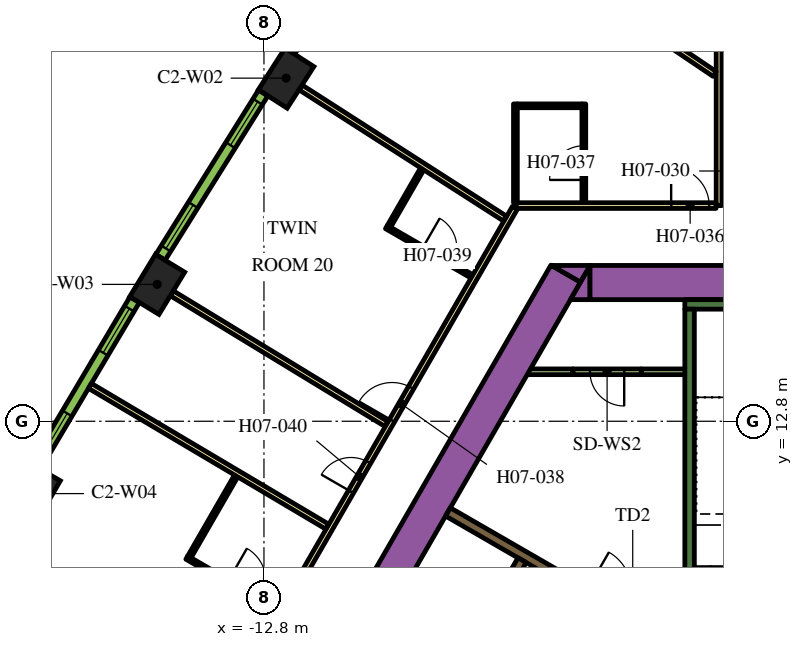
"""IFC4 building model, lengths in metres.
Left out: names, types, materials, properties, quantities, classifications, styles, units other than length and angle.
Written with IfcOpenShell. Run it as: python <this file> out.ifc"""

import sys

from ifc_helpers import new_model, si_unit, direction, frame, frame_2d, origin, origin_2d, place, context, subcontext, project, spatial, polyline, rectangle, outline, extrude, element, fill, save


model = new_model("IFC4")
c1 = context("Model", 3, precision=1e-05, world=origin(), true_north=direction((0.0, 1.0)))
c2 = subcontext(c1, "Body", "Model", "MODEL_VIEW")
j1 = project(units=[si_unit("LENGTHUNIT", "METRE"), si_unit("PLANEANGLEUNIT", "RADIAN")], contexts=[c1])
p1 = place(None, origin())
s1 = spatial("IfcSite", under=j1, at=p1, CompositionType="ELEMENT")
p2 = place(p1, origin())
s2 = spatial("IfcBuilding", under=s1, at=p2, CompositionType="ELEMENT")
p3 = place(p2, frame((0.0, 0.0, 95.4)))
s3 = spatial("IfcBuildingStorey", under=s2, at=p3, CompositionType="ELEMENT", Elevation=95.4)
for number, where, z_axis, x_axis in (
    (1, (-12.217, 21.828, 0.0), (0.0, 0.0, 1.0), (-0.54, -0.842, 0.0)),
    (2, (-15.609, 16.402, 0.0), (0.0, 0.0, 1.0), (-0.52, -0.854, 0.0)),
    (3, (-18.874, 10.897, 0.0), (0.0, 0.0, 1.0), (-0.5, -0.866, 0.0)),
):
    element("IfcColumn", number, at=place(p3, frame(where, z_axis=z_axis, x_axis=x_axis)), inside=s3, PredefinedType="COLUMN", context=c2, shape_type="SweptSolid", body=[
        extrude(rectangle(XDim=1.3, YDim=0.9, at=origin_2d()), origin(), (0.0, 0.0, 1.0), 3.9),
    ])
p4 = place(p3, frame((-15.36, -1.503, 0.0), z_axis=(0.0, 0.0, 1.0), x_axis=(0.50000389221, 0.866023156604, 0.0)))
e4 = element("IfcWall", 4, at=p4, inside=s3, PredefinedType="SOLIDWALL", context=c2, shape_type="SweptSolid", body=[
    extrude(rectangle(XDim=21.0, YDim=0.9, at=frame_2d((10.5, 0.0))), origin(), (0.0, 0.0, 1.0), 3.9),
])
p5 = place(p3, origin())
e5 = element("IfcWall", 5, at=p5, inside=s3, PredefinedType="SOLIDWALL", context=c2, shape_type="SweptSolid", body=[
    extrude(outline(polyline([(-4.215, 16.9), (-4.469, 16.46), (-5.231, 16.9), (-4.215, 16.9)])), origin(), (0.0, 0.0, 1.0), 3.9),
])
p6 = place(p3, frame((-4.224, 16.45, 0.0), z_axis=(0.0, 0.0, 1.0), x_axis=(1.0, 0.0, 0.0)))
e6 = element("IfcWall", 6, at=p6, inside=s3, PredefinedType="SOLIDWALL", context=c2, shape_type="SweptSolid", body=[
    extrude(rectangle(XDim=9.488, YDim=0.9, at=frame_2d((4.744, 0.0))), origin(), (0.0, 0.0, 1.0), 3.9),
])
e7 = element("IfcWall", 7, at=p5, inside=s3, PredefinedType="SOLIDWALL", context=c2, shape_type="SweptSolid", body=[
    extrude(outline(polyline([(-4.734, 16.0), (-4.226, 16.88), (-4.226, 16.0), (-4.734, 16.0)])), origin(), (0.0, 0.0, 1.0), 3.9),
])
p7 = place(p3, frame((-1.725, 15.875, 0.0), z_axis=(0.0, 0.0, 1.0), x_axis=(1.0, 0.0, 0.0)))
e8 = element("IfcWall", 8, at=p7, inside=s3, PredefinedType="SOLIDWALL", context=c2, shape_type="SweptSolid", body=[
    extrude(rectangle(XDim=3.45, YDim=0.25, at=frame_2d((1.725, 0.0))), origin(), (0.0, 0.0, 1.0), 3.9),
])
p8 = place(p3, frame((-1.6, 8.7, 0.0), z_axis=(0.0, 0.0, 1.0), x_axis=(0.0, 1.0, 0.0)))
e9 = element("IfcWall", 9, at=p8, inside=s3, PredefinedType="SOLIDWALL", context=c2, shape_type="SweptSolid", body=[
    extrude(rectangle(XDim=7.05, YDim=0.25, at=frame_2d((3.525, 0.0))), origin(), (0.0, 0.0, 1.0), 3.9),
])
p9 = place(p3, frame((-7.959, 10.415, 0.0), z_axis=(0.0, 0.0, 1.0), x_axis=(0.866020958405, -0.500007699544, 0.0)))
e10 = element("IfcWall", 10, at=p9, inside=s3, PredefinedType="SOLIDWALL", context=c2, shape_type="SweptSolid", body=[
    extrude(rectangle(XDim=4.1, YDim=0.25, at=frame_2d((2.05, 0.0))), origin(), (0.0, 0.0, 1.0), 3.9),
])
p10 = place(p3, frame((-5.851, 14.102, 0.0), z_axis=(0.0, 0.0, 1.0), x_axis=(1.0, 0.0, 0.0)))
e11 = element("IfcWall", 11, at=p10, inside=s3, PredefinedType="PARTITIONING", context=c2, shape_type="SweptSolid", body=[
    extrude(rectangle(XDim=1.18, YDim=0.15, at=frame_2d((0.59, 0.0))), origin(), (0.0, 0.0, 1.0), 2.75),
])
p11 = place(p3, frame((-2.871, 14.102, 0.0), z_axis=(0.0, 0.0, 1.0), x_axis=(1.0, 0.0, 0.0)))
e12 = element("IfcWall", 12, at=p11, inside=s3, PredefinedType="PARTITIONING", context=c2, shape_type="SweptSolid", body=[
    extrude(rectangle(XDim=1.196, YDim=0.15, at=frame_2d((0.598, 0.0))), origin(), (0.0, 0.0, 1.0), 2.75),
])
p12 = place(p3, frame((-6.008, 9.144, 0.0), z_axis=(0.0, 0.0, 1.0), x_axis=(-0.500006956611, -0.866021387346, 0.0)))
e13 = element("IfcWall", 13, at=p12, inside=s3, PredefinedType="SOLIDWALL", context=c2, shape_type="SweptSolid", body=[
    extrude(rectangle(XDim=9.83, YDim=0.25, at=frame_2d((4.915, 0.0))), origin(), (0.0, 0.0, 1.0), 3.9),
])
p13 = place(p12, frame((6.985, 0.0, 0.0)))
e14 = element("IfcOpeningElement", 14, at=p13, cuts=e13, PredefinedType="OPENING", context=c2, shape_type="SweptSolid", body=[
    extrude(rectangle(XDim=0.9, YDim=2.1, at=frame_2d((0.45, 1.05))), frame((0.0, 0.135, 0.0), z_axis=(0.0, -1.0, 0.0), x_axis=(1.0, 0.0, 0.0)), (0.0, 0.0, 1.0), 0.27),
])
p14 = place(p3, frame((-2.871, 14.102, 0.0), z_axis=(0.0, 0.0, 1.0), x_axis=(-1.0, 0.0, 0.0)))
e15 = element("IfcWall", 15, at=p14, inside=s3, PredefinedType="PARTITIONING", context=c2, shape_type="SweptSolid", body=[
    extrude(rectangle(XDim=1.8, YDim=0.15, at=frame_2d((0.9, 0.0))), origin(), (0.0, 0.0, 1.0), 2.75),
])
p15 = place(p14, frame((0.45, 0.0, 0.0)))
e16 = element("IfcOpeningElement", 16, at=p15, cuts=e15, PredefinedType="OPENING", context=c2, shape_type="SweptSolid", body=[
    extrude(rectangle(XDim=0.9, YDim=2.1, at=frame_2d((0.45, 1.05))), frame((0.0, 0.085, 0.0), z_axis=(0.0, -1.0, 0.0), x_axis=(1.0, 0.0, 0.0)), (0.0, 0.0, 1.0), 0.17),
])
p16 = place(p3, frame((-0.825, 18.475, 0.0), z_axis=(0.0, 0.0, 1.0), x_axis=(0.0, 1.0, 0.0)))
e17 = element("IfcWall", 17, at=p16, inside=s3, PredefinedType="PARTITIONING", context=c2, shape_type="SweptSolid", body=[
    extrude(rectangle(XDim=13.623, YDim=0.15, at=frame_2d((6.812, 0.0))), origin(), (0.0, 0.0, 1.0), 2.75),
])
p17 = place(p16, frame((4.135, 0.0, 0.0)))
e18 = element("IfcOpeningElement", 18, at=p17, cuts=e17, PredefinedType="OPENING", context=c2, shape_type="SweptSolid", body=[
    extrude(rectangle(XDim=1.0, YDim=2.1, at=frame_2d((0.5, 1.05))), frame((0.0, 0.085, 0.0), z_axis=(0.0, -1.0, 0.0), x_axis=(1.0, 0.0, 0.0)), (0.0, 0.0, 1.0), 0.17),
])
p18 = place(p3, frame((-6.163, 18.475, 0.0), z_axis=(0.0, 0.0, 1.0), x_axis=(1.0, 0.0, 0.0)))
e19 = element("IfcWall", 19, at=p18, inside=s3, PredefinedType="PARTITIONING", context=c2, shape_type="SweptSolid", body=[
    extrude(rectangle(XDim=5.258, YDim=0.15, at=frame_2d((2.629, 0.0))), origin(), (0.0, 0.0, 1.0), 2.75),
])
p19 = place(p18, frame((4.078, 0.0, 0.0)))
e20 = element("IfcOpeningElement", 20, at=p19, cuts=e19, PredefinedType="OPENING", context=c2, shape_type="SweptSolid", body=[
    extrude(rectangle(XDim=1.0, YDim=2.1, at=frame_2d((0.5, 1.05))), frame((0.0, 0.085, 0.0), z_axis=(0.0, -1.0, 0.0), x_axis=(1.0, 0.0, 0.0)), (0.0, 0.0, 1.0), 0.17),
])
p20 = place(p3, frame((-19.081, -3.9, 0.0), z_axis=(0.0, 0.0, 1.0), x_axis=(0.499998313975, 0.866026377209, 0.0)))
e21 = element("IfcWall", 21, at=p20, inside=s3, PredefinedType="PARTITIONING", context=c2, shape_type="SweptSolid", body=[
    extrude(rectangle(XDim=25.766, YDim=0.15, at=frame_2d((12.883, 0.0))), origin(), (0.0, 0.0, 1.0), 2.75),
])
p21 = place(p20, frame((19.306, 0.0, 0.0)))
e22 = element("IfcOpeningElement", 22, at=p21, cuts=e21, PredefinedType="OPENING", context=c2, shape_type="SweptSolid", body=[
    extrude(rectangle(XDim=1.0, YDim=2.1, at=frame_2d((0.5, 1.05))), frame((0.0, 0.085, 0.0), z_axis=(0.0, -1.0, 0.0), x_axis=(1.0, 0.0, 0.0)), (0.0, 0.0, 1.0), 0.17),
])
p22 = place(p20, frame((17.144, 0.0, 0.0)))
e23 = element("IfcOpeningElement", 23, at=p22, cuts=e21, PredefinedType="OPENING", context=c2, shape_type="SweptSolid", body=[
    extrude(rectangle(XDim=0.9, YDim=2.1, at=frame_2d((0.45, 1.05))), frame((0.0, 0.085, 0.0), z_axis=(0.0, -1.0, 0.0), x_axis=(1.0, 0.0, 0.0)), (0.0, 0.0, 1.0), 0.17),
])
p23 = place(p20, frame((9.955, 0.0, 0.0)))
e24 = element("IfcOpeningElement", 24, at=p23, cuts=e21, PredefinedType="OPENING", context=c2, shape_type="SweptSolid", body=[
    extrude(rectangle(XDim=1.1, YDim=2.1, at=frame_2d((0.55, 1.05))), frame((0.0, 0.085, 0.0), z_axis=(0.0, -1.0, 0.0), x_axis=(1.0, 0.0, 0.0)), (0.0, 0.0, 1.0), 0.17),
])
p24 = place(p20, frame((8.648, 0.0, 0.0)))
e25 = element("IfcOpeningElement", 25, at=p24, cuts=e21, PredefinedType="OPENING", context=c2, shape_type="SweptSolid", body=[
    extrude(rectangle(XDim=1.0, YDim=2.1, at=frame_2d((0.5, 1.05))), frame((0.0, 0.085, 0.0), z_axis=(0.0, -1.0, 0.0), x_axis=(1.0, 0.0, 0.0)), (0.0, 0.0, 1.0), 0.17),
])
p25 = place(p20, frame((1.553, 0.0, 0.0)))
e26 = element("IfcOpeningElement", 26, at=p25, cuts=e21, PredefinedType="OPENING", context=c2, shape_type="SweptSolid", body=[
    extrude(rectangle(XDim=0.9, YDim=2.1, at=frame_2d((0.45, 1.05))), frame((0.0, 0.085, 0.0), z_axis=(0.0, -1.0, 0.0), x_axis=(1.0, 0.0, 0.0)), (0.0, 0.0, 1.0), 0.17),
])
p26 = place(p3, frame((-17.379, 13.731, 0.0), z_axis=(0.0, 0.0, 1.0), x_axis=(0.860132461691, -0.510070728768, 0.0)))
e27 = element("IfcWall", 27, at=p26, inside=s3, PredefinedType="PARTITIONING", context=c2, shape_type="SweptSolid", body=[
    extrude(rectangle(XDim=7.257, YDim=0.15, at=frame_2d((3.628, 0.0))), origin(), (0.0, 0.0, 1.0), 2.75),
])
p27 = place(p3, frame((-15.225, 16.167, 0.0), z_axis=(0.0, 0.0, 1.0), x_axis=(0.854088713274, -0.520127359266, 0.0)))
e28 = element("IfcWall", 28, at=p27, inside=s3, PredefinedType="PARTITIONING", context=c2, shape_type="SweptSolid", body=[
    extrude(rectangle(XDim=6.611, YDim=0.15, at=frame_2d((3.305, 0.0))), origin(), (0.0, 0.0, 1.0), 2.75),
])
p28 = place(p3, frame((-11.838, 21.585, 0.0), z_axis=(0.0, 0.0, 1.0), x_axis=(0.841699322813, -0.539946525108, 0.0)))
e29 = element("IfcWall", 29, at=p28, inside=s3, PredefinedType="PARTITIONING", context=c2, shape_type="SweptSolid", body=[
    extrude(rectangle(XDim=6.392, YDim=0.15, at=frame_2d((3.196, 0.0))), origin(), (0.0, 0.0, 1.0), 2.75),
])
p29 = place(p3, frame((-8.326, 26.923, 0.0), z_axis=(0.0, 0.0, 1.0), x_axis=(0.828836601893, -0.5594907393, 0.0)))
e30 = element("IfcWall", 30, at=p29, inside=s3, PredefinedType="PARTITIONING", context=c2, shape_type="SweptSolid", body=[
    extrude(rectangle(XDim=8.909, YDim=0.15, at=frame_2d((4.455, 0.0))), origin(), (0.0, 0.0, 1.0), 2.75),
])
p30 = place(p3, frame((-4.383, 18.55, 0.0), z_axis=(0.0, 0.0, 1.0), x_axis=(0.0, 1.0, 0.0)))
e31 = element("IfcWall", 31, at=p30, inside=s3, PredefinedType="PARTITIONING", context=c2, shape_type="SweptSolid", body=[
    extrude(rectangle(XDim=2.6, YDim=0.1, at=frame_2d((1.3, 0.0))), origin(), (0.0, 0.0, 1.0), 2.75),
])
p31 = place(p30, frame((0.6, 0.0, 0.0)))
e32 = element("IfcOpeningElement", 32, at=p31, cuts=e31, PredefinedType="OPENING", context=c2, shape_type="SweptSolid", body=[
    extrude(rectangle(XDim=0.9, YDim=2.1, at=frame_2d((0.45, 1.05))), frame((0.0, 0.06, 0.0), z_axis=(0.0, -1.0, 0.0), x_axis=(1.0, 0.0, 0.0)), (0.0, 0.0, 1.0), 0.12),
])
p32 = place(p3, frame((-4.433, 21.1, 0.0), z_axis=(0.0, 0.0, 1.0), x_axis=(-1.0, 0.0, 0.0)))
e33 = element("IfcWall", 33, at=p32, inside=s3, PredefinedType="PARTITIONING", context=c2, shape_type="SweptSolid", body=[
    extrude(rectangle(XDim=1.7, YDim=0.1, at=frame_2d((0.85, 0.0))), origin(), (0.0, 0.0, 1.0), 2.75),
])
p33 = place(p3, frame((-6.183, 18.55, 0.0), z_axis=(0.0, 0.0, 1.0), x_axis=(0.0, 1.0, 0.0)))
e34 = element("IfcWall", 34, at=p33, inside=s3, PredefinedType="PARTITIONING", context=c2, shape_type="SweptSolid", body=[
    extrude(rectangle(XDim=2.6, YDim=0.1, at=frame_2d((1.3, 0.0))), origin(), (0.0, 0.0, 1.0), 2.75),
])
p34 = place(p3, frame((-9.578, 17.911, 0.0), z_axis=(0.0, 0.0, 1.0), x_axis=(0.866021400173, -0.500006934395, 0.0)))
e35 = element("IfcWall", 35, at=p34, inside=s3, PredefinedType="PARTITIONING", context=c2, shape_type="SweptSolid", body=[
    extrude(rectangle(XDim=2.6, YDim=0.1, at=frame_2d((1.3, 0.0))), origin(), (0.0, 0.0, 1.0), 2.75),
])
p35 = place(p34, frame((1.1, 0.0, 0.0)))
e36 = element("IfcOpeningElement", 36, at=p35, cuts=e35, PredefinedType="OPENING", context=c2, shape_type="SweptSolid", body=[
    extrude(rectangle(XDim=0.9, YDim=2.1, at=frame_2d((0.45, 1.05))), frame((0.0, 0.06, 0.0), z_axis=(0.0, -1.0, 0.0), x_axis=(1.0, 0.0, 0.0)), (0.0, 0.0, 1.0), 0.12),
])
p36 = place(p3, frame((-9.51, 17.929, 0.0), z_axis=(0.0, 0.0, 1.0), x_axis=(0.500062521093, 0.865989304205, 0.0)))
e37 = element("IfcWall", 37, at=p36, inside=s3, PredefinedType="PARTITIONING", context=c2, shape_type="SweptSolid", body=[
    extrude(rectangle(XDim=1.74, YDim=0.1, at=frame_2d((0.87, 0.0))), origin(), (0.0, 0.0, 1.0), 2.75),
])
p37 = place(p3, frame((-14.83, 9.213, 0.0), z_axis=(0.0, 0.0, 1.0), x_axis=(0.866034573852, -0.49998411664, 0.0)))
e38 = element("IfcWall", 38, at=p37, inside=s3, PredefinedType="PARTITIONING", context=c2, shape_type="SweptSolid", body=[
    extrude(rectangle(XDim=2.8, YDim=0.1, at=frame_2d((1.4, 0.0))), origin(), (0.0, 0.0, 1.0), 2.75),
])
p38 = place(p37, frame((1.25, 0.0, 0.0)))
e39 = element("IfcOpeningElement", 39, at=p38, cuts=e38, PredefinedType="OPENING", context=c2, shape_type="SweptSolid", body=[
    extrude(rectangle(XDim=1.0, YDim=2.1, at=frame_2d((0.5, 1.05))), frame((0.0, 0.06, 0.0), z_axis=(0.0, -1.0, 0.0), x_axis=(1.0, 0.0, 0.0)), (0.0, 0.0, 1.0), 0.12),
])
p39 = place(p3, frame((-14.762, 9.231, 0.0), z_axis=(0.0, 0.0, 1.0), x_axis=(0.500003092839, 0.866023618125, 0.0)))
e40 = element("IfcWall", 40, at=p39, inside=s3, PredefinedType="PARTITIONING", context=c2, shape_type="SweptSolid", body=[
    extrude(rectangle(XDim=2.46, YDim=0.1, at=frame_2d((1.23, 0.0))), origin(), (0.0, 0.0, 1.0), 2.75),
])
p40 = place(p3, frame((-9.311, 26.799, 0.0), z_axis=(0.0, 0.0, 1.0), x_axis=(-0.549741341923, -0.835334937005, 0.0)))
e41 = element("IfcWall", 41, at=p40, inside=s3, PredefinedType="SOLIDWALL", context=c2, shape_type="SweptSolid", body=[
    extrude(rectangle(XDim=5.1, YDim=0.29, at=frame_2d((2.55, 0.0))), origin(), (0.0, 0.0, 1.0), 3.65),
])
p41 = place(p40, frame((0.273, 0.0, 0.9)))
e42 = element("IfcOpeningElement", 42, at=p41, cuts=e41, PredefinedType="OPENING", context=c2, shape_type="SweptSolid", body=[
    extrude(rectangle(XDim=1.35, YDim=2.15, at=frame_2d((0.675, 1.075))), frame((0.0, 0.155, 0.0), z_axis=(0.0, -1.0, 0.0), x_axis=(1.0, 0.0, 0.0)), (0.0, 0.0, 1.0), 0.31),
])
p42 = place(p40, frame((3.478, 0.0, 0.9)))
e43 = element("IfcOpeningElement", 43, at=p42, cuts=e41, PredefinedType="OPENING", context=c2, shape_type="SweptSolid", body=[
    extrude(rectangle(XDim=1.35, YDim=2.15, at=frame_2d((0.675, 1.075))), frame((0.0, 0.155, 0.0), z_axis=(0.0, -1.0, 0.0), x_axis=(1.0, 0.0, 0.0)), (0.0, 0.0, 1.0), 0.31),
])
p43 = place(p3, frame((-12.82, 21.439, 0.0), z_axis=(0.0, 0.0, 1.0), x_axis=(-0.530072082134, -0.847952585787, 0.0)))
e44 = element("IfcWall", 44, at=p43, inside=s3, PredefinedType="SOLIDWALL", context=c2, shape_type="SweptSolid", body=[
    extrude(rectangle(XDim=5.1, YDim=0.29, at=frame_2d((2.55, 0.0))), origin(), (0.0, 0.0, 1.0), 3.65),
])
p44 = place(p43, frame((0.273, 0.0, 0.9)))
e45 = element("IfcOpeningElement", 45, at=p44, cuts=e44, PredefinedType="OPENING", context=c2, shape_type="SweptSolid", body=[
    extrude(rectangle(XDim=1.35, YDim=2.15, at=frame_2d((0.675, 1.075))), frame((0.0, 0.155, 0.0), z_axis=(0.0, -1.0, 0.0), x_axis=(1.0, 0.0, 0.0)), (0.0, 0.0, 1.0), 0.31),
])
p45 = place(p43, frame((3.478, 0.0, 0.9)))
e46 = element("IfcOpeningElement", 46, at=p45, cuts=e44, PredefinedType="OPENING", context=c2, shape_type="SweptSolid", body=[
    extrude(rectangle(XDim=1.35, YDim=2.15, at=frame_2d((0.675, 1.075))), frame((0.0, 0.155, 0.0), z_axis=(0.0, -1.0, 0.0), x_axis=(1.0, 0.0, 0.0)), (0.0, 0.0, 1.0), 0.31),
])
p46 = place(p3, frame((-16.203, 15.998, 0.0), z_axis=(0.0, 0.0, 1.0), x_axis=(-0.510054281659, -0.860142214847, 0.0)))
e47 = element("IfcWall", 47, at=p46, inside=s3, PredefinedType="SOLIDWALL", context=c2, shape_type="SweptSolid", body=[
    extrude(rectangle(XDim=5.101, YDim=0.29, at=frame_2d((2.55, 0.0))), origin(), (0.0, 0.0, 1.0), 3.65),
])
p47 = place(p46, frame((0.273, 0.0, 0.9)))
e48 = element("IfcOpeningElement", 48, at=p47, cuts=e47, PredefinedType="OPENING", context=c2, shape_type="SweptSolid", body=[
    extrude(rectangle(XDim=1.35, YDim=2.15, at=frame_2d((0.675, 1.075))), frame((0.0, 0.155, 0.0), z_axis=(0.0, -1.0, 0.0), x_axis=(1.0, 0.0, 0.0)), (0.0, 0.0, 1.0), 0.31),
])
p48 = place(p46, frame((3.478, 0.0, 0.9)))
e49 = element("IfcOpeningElement", 49, at=p48, cuts=e47, PredefinedType="OPENING", context=c2, shape_type="SweptSolid", body=[
    extrude(rectangle(XDim=1.35, YDim=2.15, at=frame_2d((0.675, 1.075))), frame((0.0, 0.155, 0.0), z_axis=(0.0, -1.0, 0.0), x_axis=(1.0, 0.0, 0.0)), (0.0, 0.0, 1.0), 0.31),
])
p49 = place(p15, origin())
e50 = element("IfcDoor", 50, at=p49, inside=s3, OperationType="SINGLE_SWING_LEFT", PredefinedType="DOOR", context=c2, shape_type="SweptSolid", body=[
    extrude(rectangle(XDim=0.9, YDim=2.1, at=frame_2d((0.45, 1.05))), frame((0.0, 0.025, 0.0), z_axis=(0.0, -1.0, 0.0), x_axis=(1.0, 0.0, 0.0)), (0.0, 0.0, 1.0), 0.05),
])
fill(e16, e50)
p50 = place(p19, origin())
e51 = element("IfcDoor", 51, at=p50, inside=s3, OperationType="SINGLE_SWING_RIGHT", PredefinedType="DOOR", context=c2, shape_type="SweptSolid", body=[
    extrude(rectangle(XDim=1.0, YDim=2.1, at=frame_2d((0.5, 1.05))), frame((0.0, 0.025, 0.0), z_axis=(0.0, -1.0, 0.0), x_axis=(1.0, 0.0, 0.0)), (0.0, 0.0, 1.0), 0.05),
])
fill(e20, e51)
p51 = place(p31, origin())
e52 = element("IfcDoor", 52, at=p51, inside=s3, OperationType="SINGLE_SWING_LEFT", PredefinedType="DOOR", context=c2, shape_type="SweptSolid", body=[
    extrude(rectangle(XDim=0.9, YDim=2.1, at=frame_2d((0.45, 1.05))), frame((0.0, 0.025, 0.0), z_axis=(0.0, -1.0, 0.0), x_axis=(1.0, 0.0, 0.0)), (0.0, 0.0, 1.0), 0.05),
])
fill(e32, e52)
p52 = place(p21, origin())
e53 = element("IfcDoor", 53, at=p52, inside=s3, OperationType="SINGLE_SWING_LEFT", PredefinedType="DOOR", context=c2, shape_type="SweptSolid", body=[
    extrude(rectangle(XDim=1.0, YDim=2.1, at=frame_2d((0.5, 1.05))), frame((0.0, 0.025, 0.0), z_axis=(0.0, -1.0, 0.0), x_axis=(1.0, 0.0, 0.0)), (0.0, 0.0, 1.0), 0.05),
])
fill(e22, e53)
p53 = place(p35, origin())
e54 = element("IfcDoor", 54, at=p53, inside=s3, OperationType="SINGLE_SWING_LEFT", PredefinedType="DOOR", context=c2, shape_type="SweptSolid", body=[
    extrude(rectangle(XDim=0.9, YDim=2.1, at=frame_2d((0.45, 1.05))), frame((0.0, 0.025, 0.0), z_axis=(0.0, -1.0, 0.0), x_axis=(1.0, 0.0, 0.0)), (0.0, 0.0, 1.0), 0.05),
])
fill(e36, e54)
p54 = place(p22, origin())
e55 = element("IfcDoor", 55, at=p54, inside=s3, OperationType="SINGLE_SWING_LEFT", PredefinedType="DOOR", context=c2, shape_type="SweptSolid", body=[
    extrude(rectangle(XDim=0.9, YDim=2.1, at=frame_2d((0.45, 1.05))), frame((0.0, 0.025, 0.0), z_axis=(0.0, -1.0, 0.0), x_axis=(1.0, 0.0, 0.0)), (0.0, 0.0, 1.0), 0.05),
])
fill(e23, e55)
p55 = place(p44, origin())
e56 = element("IfcWindow", 56, at=p55, inside=s3, PartitioningType="DOUBLE_PANEL_VERTICAL", PredefinedType="WINDOW", context=c2, shape_type="SweptSolid", body=[
    extrude(rectangle(XDim=1.35, YDim=2.15, at=frame_2d((0.675, 1.075))), frame((0.0, 0.015, 0.0), z_axis=(0.0, -1.0, 0.0), x_axis=(1.0, 0.0, 0.0)), (0.0, 0.0, 1.0), 0.06),
])
fill(e45, e56)
p56 = place(p45, origin())
e57 = element("IfcWindow", 57, at=p56, inside=s3, PartitioningType="DOUBLE_PANEL_VERTICAL", PredefinedType="WINDOW", context=c2, shape_type="SweptSolid", body=[
    extrude(rectangle(XDim=1.35, YDim=2.15, at=frame_2d((0.675, 1.075))), frame((0.0, 0.015, 0.0), z_axis=(0.0, -1.0, 0.0), x_axis=(1.0, 0.0, 0.0)), (0.0, 0.0, 1.0), 0.06),
])
fill(e46, e57)
p57 = place(p47, origin())
e58 = element("IfcWindow", 58, at=p57, inside=s3, PartitioningType="DOUBLE_PANEL_VERTICAL", PredefinedType="WINDOW", context=c2, shape_type="SweptSolid", body=[
    extrude(rectangle(XDim=1.35, YDim=2.15, at=frame_2d((0.675, 1.075))), frame((0.0, 0.015, 0.0), z_axis=(0.0, -1.0, 0.0), x_axis=(1.0, 0.0, 0.0)), (0.0, 0.0, 1.0), 0.06),
])
fill(e48, e58)
p58 = place(p48, origin())
e59 = element("IfcWindow", 59, at=p58, inside=s3, PartitioningType="DOUBLE_PANEL_VERTICAL", PredefinedType="WINDOW", context=c2, shape_type="SweptSolid", body=[
    extrude(rectangle(XDim=1.35, YDim=2.15, at=frame_2d((0.675, 1.075))), frame((0.0, 0.015, 0.0), z_axis=(0.0, -1.0, 0.0), x_axis=(1.0, 0.0, 0.0)), (0.0, 0.0, 1.0), 0.06),
])
fill(e49, e59)
save(model, sys.argv[1])
